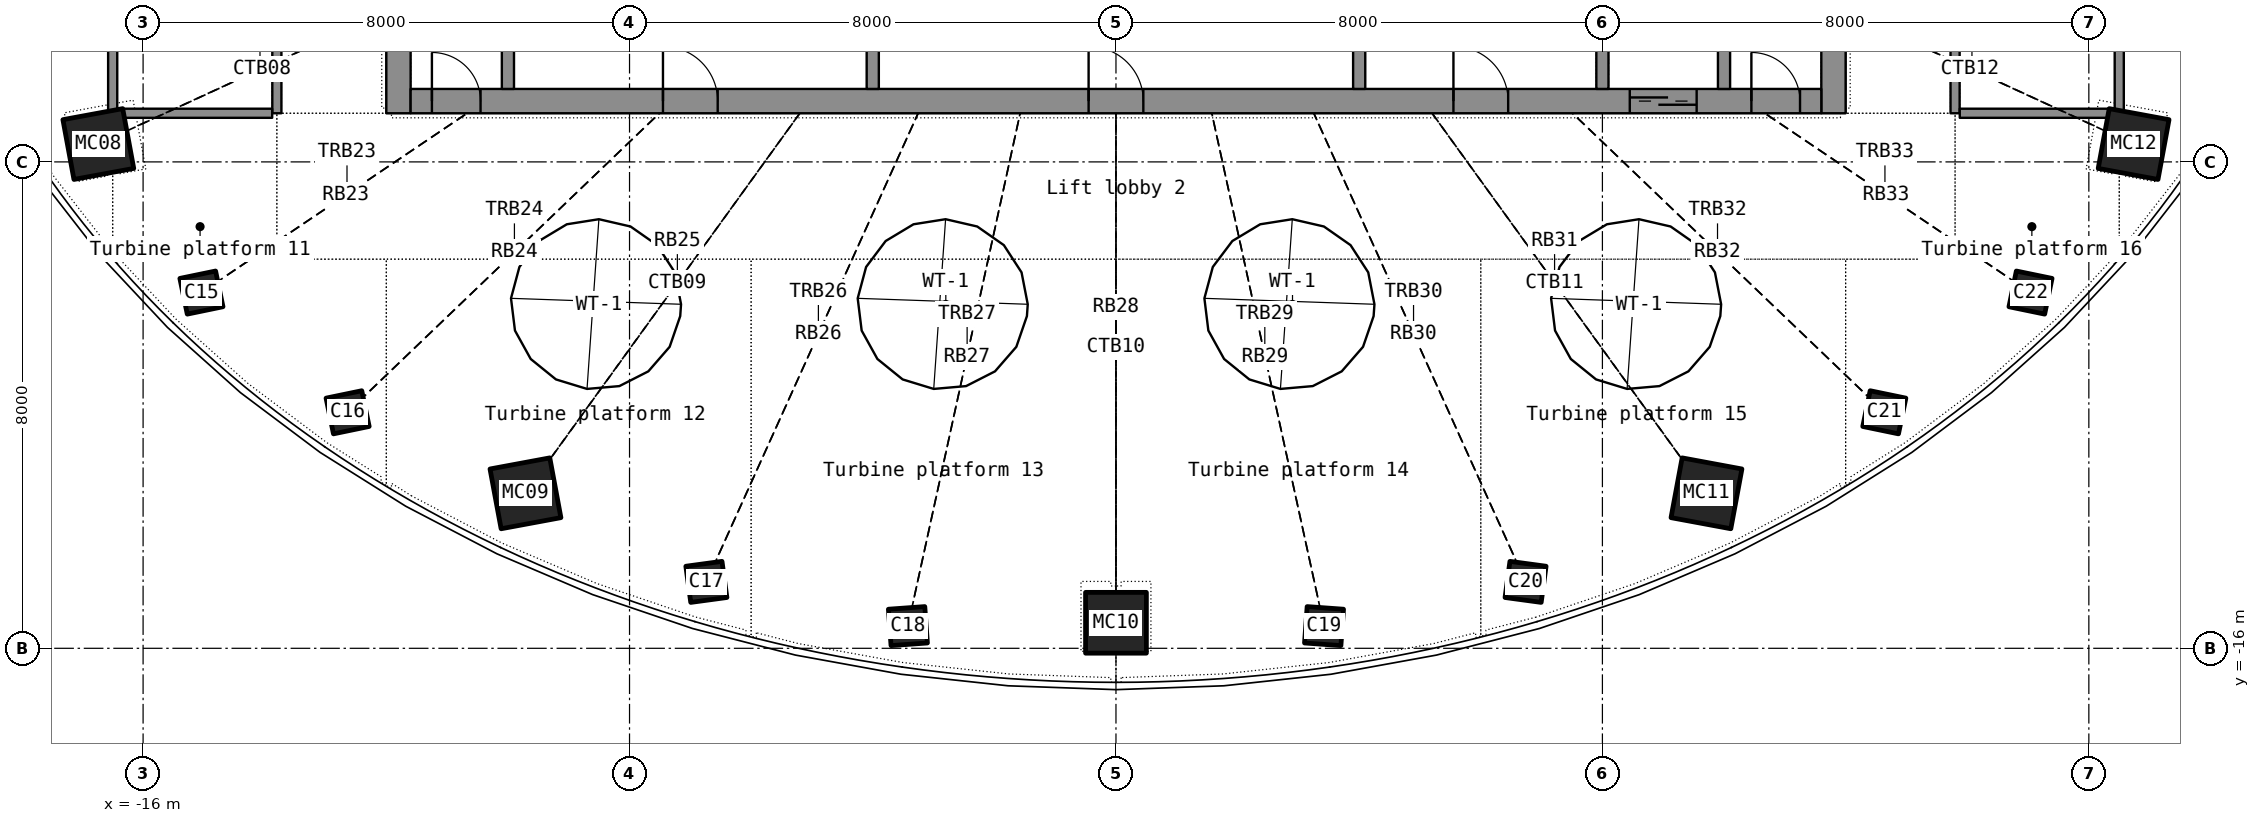
"""IFC4 building model, lengths in metres.
Left out: names, types, materials, properties, quantities, classifications, styles, units other than length and angle.
Written with IfcOpenShell. Run it as: python <this file> out.ifc"""

import sys

from ifc_helpers import new_model, si_unit, direction, frame, frame_2d, origin, origin_2d, place, context, subcontext, project, spatial, rectangle, hollow_rectangle, extrude, element, fill, save


model = new_model("IFC4")
c1 = context("Model", 3, precision=1e-05, world=origin(), true_north=direction((0.0, 1.0)))
c2 = subcontext(c1, "Body", "Model", "MODEL_VIEW")
j1 = project(units=[si_unit("LENGTHUNIT", "METRE"), si_unit("PLANEANGLEUNIT", "RADIAN")], contexts=[c1])
p1 = place(None, origin())
s1 = spatial("IfcSite", under=j1, at=p1, CompositionType="ELEMENT")
p2 = place(p1, origin())
s2 = spatial("IfcBuilding", under=s1, at=p2, CompositionType="ELEMENT")
p3 = place(p2, frame((0.0, 0.0, 265.2)))
s3 = spatial("IfcBuildingStorey", under=s2, at=p3, CompositionType="ELEMENT", Elevation=265.2)
p4 = place(p3, frame((-16.736, -7.706, 0.0), z_axis=(0.02993968, 0.014178483, 0.999451142), x_axis=(-0.58479336, 0.811160032, 0.006010807)))
e1 = element("IfcColumn", 1, at=p4, inside=s3, PredefinedType="COLUMN", context=c2, shape_type="SweptSolid", body=[
    extrude(hollow_rectangle(XDim=1.0, YDim=1.0, WallThickness=0.032, at=origin_2d()), origin(), (0.0, 0.0, 1.0), 7.404),
])
p5 = place(p3, frame((-15.041, -10.149, 0.0), z_axis=(0.026511305, 0.018201791, 0.999482789), x_axis=(-0.721084308, 0.692816746, 0.006509747)))
e2 = element("IfcColumn", 2, at=p5, inside=s3, PredefinedType="COLUMN", context=c2, shape_type="SweptSolid", body=[
    extrude(hollow_rectangle(XDim=0.6, YDim=0.6, WallThickness=0.025, at=origin_2d()), origin(), (0.0, 0.0, 1.0), 7.404),
])
p6 = place(p3, frame((-12.636, -12.118, 0.0), z_axis=(0.022225407, 0.021730776, 0.999516786), x_axis=(-0.829477504, 0.558504573, 0.006301782)))
e3 = element("IfcColumn", 3, at=p6, inside=s3, PredefinedType="COLUMN", context=c2, shape_type="SweptSolid", body=[
    extrude(hollow_rectangle(XDim=0.6, YDim=0.6, WallThickness=0.025, at=origin_2d()), origin(), (0.0, 0.0, 1.0), 7.404),
])
p7 = place(p3, frame((-9.711, -13.451, 0.0), z_axis=(0.017279668, 0.02453449, 0.999549635), x_axis=(-0.908911912, 0.416952184, 0.005478454)))
e4 = element("IfcColumn", 4, at=p7, inside=s3, PredefinedType="COLUMN", context=c2, shape_type="SweptSolid", body=[
    extrude(hollow_rectangle(XDim=1.0, YDim=1.0, WallThickness=0.032, at=origin_2d()), origin(), (0.0, 0.0, 1.0), 7.404),
])
p8 = place(p3, frame((-6.736, -14.907, 0.0), z_axis=(0.011805877, 0.026645666, 0.999575225), x_axis=(-0.960364691, 0.278719123, 0.003912953)))
e5 = element("IfcColumn", 5, at=p8, inside=s3, PredefinedType="COLUMN", context=c2, shape_type="SweptSolid", body=[
    extrude(hollow_rectangle(XDim=0.6, YDim=0.6, WallThickness=0.025, at=origin_2d()), origin(), (0.0, 0.0, 1.0), 7.403),
])
p9 = place(p3, frame((-3.422, -15.635, 0.0), z_axis=(0.006001975, 0.027899292, 0.99959272), x_axis=(-0.990225435, 0.139461007, 0.002053282)))
e6 = element("IfcColumn", 6, at=p9, inside=s3, PredefinedType="COLUMN", context=c2, shape_type="SweptSolid", body=[
    extrude(hollow_rectangle(XDim=0.6, YDim=0.6, WallThickness=0.025, at=origin_2d()), origin(), (0.0, 0.0, 1.0), 7.403),
])
p10 = place(p3, frame((0.0, -15.58, 0.0), z_axis=(0.0, 0.028361125, 0.999597742), x_axis=(-1.0, 0.0, 0.0)))
e7 = element("IfcColumn", 7, at=p10, inside=s3, PredefinedType="COLUMN", context=c2, shape_type="SweptSolid", body=[
    extrude(hollow_rectangle(XDim=1.0, YDim=1.0, WallThickness=0.032, at=origin_2d()), origin(), (0.0, 0.0, 1.0), 7.403),
])
p11 = place(p3, frame((3.422, -15.635, 0.0), z_axis=(-0.006001975, 0.027899292, 0.99959272), x_axis=(-0.990225435, -0.139461007, -0.002053282)))
e8 = element("IfcColumn", 8, at=p11, inside=s3, PredefinedType="COLUMN", context=c2, shape_type="SweptSolid", body=[
    extrude(hollow_rectangle(XDim=0.6, YDim=0.6, WallThickness=0.025, at=origin_2d()), origin(), (0.0, 0.0, 1.0), 7.403),
])
p12 = place(p3, frame((6.736, -14.907, 0.0), z_axis=(-0.011805877, 0.026645666, 0.999575225), x_axis=(-0.960364691, -0.278719123, -0.003912953)))
e9 = element("IfcColumn", 9, at=p12, inside=s3, PredefinedType="COLUMN", context=c2, shape_type="SweptSolid", body=[
    extrude(hollow_rectangle(XDim=0.6, YDim=0.6, WallThickness=0.025, at=origin_2d()), origin(), (0.0, 0.0, 1.0), 7.403),
])
p13 = place(p3, frame((9.711, -13.451, 0.0), z_axis=(-0.017279668, 0.02453449, 0.999549635), x_axis=(-0.908911912, -0.416952184, -0.005478454)))
e10 = element("IfcColumn", 10, at=p13, inside=s3, PredefinedType="COLUMN", context=c2, shape_type="SweptSolid", body=[
    extrude(hollow_rectangle(XDim=1.0, YDim=1.0, WallThickness=0.032, at=origin_2d()), origin(), (0.0, 0.0, 1.0), 7.404),
])
p14 = place(p3, frame((12.636, -12.118, 0.0), z_axis=(-0.022225407, 0.021730776, 0.999516786), x_axis=(-0.829477504, -0.558504573, -0.006301782)))
e11 = element("IfcColumn", 11, at=p14, inside=s3, PredefinedType="COLUMN", context=c2, shape_type="SweptSolid", body=[
    extrude(hollow_rectangle(XDim=0.6, YDim=0.6, WallThickness=0.025, at=origin_2d()), origin(), (0.0, 0.0, 1.0), 7.404),
])
p15 = place(p3, frame((15.041, -10.149, 0.0), z_axis=(-0.026511305, 0.018201791, 0.999482789), x_axis=(-0.721084308, -0.692816746, -0.006509747)))
e12 = element("IfcColumn", 12, at=p15, inside=s3, PredefinedType="COLUMN", context=c2, shape_type="SweptSolid", body=[
    extrude(hollow_rectangle(XDim=0.6, YDim=0.6, WallThickness=0.025, at=origin_2d()), origin(), (0.0, 0.0, 1.0), 7.404),
])
p16 = place(p3, frame((16.736, -7.706, 0.0), z_axis=(-0.02993968, 0.014178483, 0.999451142), x_axis=(-0.58479336, -0.811160032, -0.006010807)))
e13 = element("IfcColumn", 13, at=p16, inside=s3, PredefinedType="COLUMN", context=c2, shape_type="SweptSolid", body=[
    extrude(hollow_rectangle(XDim=1.0, YDim=1.0, WallThickness=0.032, at=origin_2d()), origin(), (0.0, 0.0, 1.0), 7.404),
])
p17 = place(p3, frame((-11.8, -7.2, 0.0), z_axis=(0.0, 0.0, 1.0), x_axis=(0.0, 1.0, 0.0)))
e14 = element("IfcWall", 14, at=p17, inside=s3, PredefinedType="SHEAR", context=c2, shape_type="SweptSolid", body=[
    extrude(rectangle(XDim=14.4, YDim=0.4, at=frame_2d((7.2, 0.0))), origin(), (0.0, 0.0, 1.0), 6.9),
])
p18 = place(p17, frame((6.5, 0.0, 0.0)))
e15 = element("IfcOpeningElement", 15, at=p18, cuts=e14, PredefinedType="OPENING", context=c2, shape_type="SweptSolid", body=[
    extrude(rectangle(XDim=1.4, YDim=2.2, at=frame_2d((0.7, 1.1))), frame((0.0, 0.21, 0.0), z_axis=(0.0, -1.0, 0.0), x_axis=(1.0, 0.0, 0.0)), (0.0, 0.0, 1.0), 0.42),
])
p19 = place(p3, frame((11.8, -7.2, 0.0), z_axis=(0.0, 0.0, 1.0), x_axis=(0.0, 1.0, 0.0)))
e16 = element("IfcWall", 16, at=p19, inside=s3, PredefinedType="SHEAR", context=c2, shape_type="SweptSolid", body=[
    extrude(rectangle(XDim=14.4, YDim=0.4, at=frame_2d((7.2, 0.0))), origin(), (0.0, 0.0, 1.0), 6.9),
])
p20 = place(p19, frame((6.5, 0.0, 0.0)))
e17 = element("IfcOpeningElement", 17, at=p20, cuts=e16, PredefinedType="OPENING", context=c2, shape_type="SweptSolid", body=[
    extrude(rectangle(XDim=1.4, YDim=2.2, at=frame_2d((0.7, 1.1))), frame((0.0, 0.21, 0.0), z_axis=(0.0, -1.0, 0.0), x_axis=(1.0, 0.0, 0.0)), (0.0, 0.0, 1.0), 0.42),
])
p21 = place(p3, frame((-11.6, -7.0, 0.0), z_axis=(0.0, 0.0, 1.0), x_axis=(1.0, 0.0, 0.0)))
e18 = element("IfcWall", 18, at=p21, inside=s3, PredefinedType="SHEAR", context=c2, shape_type="SweptSolid", body=[
    extrude(rectangle(XDim=23.2, YDim=0.4, at=frame_2d((11.6, 0.0))), origin(), (0.0, 0.0, 1.0), 6.9),
])
p22 = place(p21, frame((20.05, 0.0, 0.0)))
e19 = element("IfcOpeningElement", 19, at=p22, cuts=e18, PredefinedType="OPENING", context=c2, shape_type="SweptSolid", body=[
    extrude(rectangle(XDim=1.1, YDim=2.2, at=frame_2d((0.55, 1.1))), frame((0.0, 0.21, 0.0), z_axis=(0.0, -1.0, 0.0), x_axis=(1.0, 0.0, 0.0)), (0.0, 0.0, 1.0), 0.42),
])
p23 = place(p21, frame((4.15, 0.0, 0.0)))
e20 = element("IfcOpeningElement", 20, at=p23, cuts=e18, PredefinedType="OPENING", context=c2, shape_type="SweptSolid", body=[
    extrude(rectangle(XDim=0.9, YDim=2.1, at=frame_2d((0.45, 1.05))), frame((0.0, 0.21, 0.0), z_axis=(0.0, -1.0, 0.0), x_axis=(1.0, 0.0, 0.0)), (0.0, 0.0, 1.0), 0.42),
])
p24 = place(p21, frame((11.15, 0.0, 0.0)))
e21 = element("IfcOpeningElement", 21, at=p24, cuts=e18, PredefinedType="OPENING", context=c2, shape_type="SweptSolid", body=[
    extrude(rectangle(XDim=0.9, YDim=2.1, at=frame_2d((0.45, 1.05))), frame((0.0, 0.21, 0.0), z_axis=(0.0, -1.0, 0.0), x_axis=(1.0, 0.0, 0.0)), (0.0, 0.0, 1.0), 0.42),
])
p25 = place(p21, frame((17.15, 0.0, 0.0)))
e22 = element("IfcOpeningElement", 22, at=p25, cuts=e18, PredefinedType="OPENING", context=c2, shape_type="SweptSolid", body=[
    extrude(rectangle(XDim=0.9, YDim=2.1, at=frame_2d((0.45, 1.05))), frame((0.0, 0.21, 0.0), z_axis=(0.0, -1.0, 0.0), x_axis=(1.0, 0.0, 0.0)), (0.0, 0.0, 1.0), 0.42),
])
p26 = place(p21, frame((0.35, 0.0, 0.0)))
e23 = element("IfcOpeningElement", 23, at=p26, cuts=e18, PredefinedType="OPENING", context=c2, shape_type="SweptSolid", body=[
    extrude(rectangle(XDim=0.8, YDim=2.05, at=frame_2d((0.4, 1.025))), frame((0.0, 0.21, 0.0), z_axis=(0.0, -1.0, 0.0), x_axis=(1.0, 0.0, 0.0)), (0.0, 0.0, 1.0), 0.42),
])
p27 = place(p21, frame((22.05, 0.0, 0.0)))
e24 = element("IfcOpeningElement", 24, at=p27, cuts=e18, PredefinedType="OPENING", context=c2, shape_type="SweptSolid", body=[
    extrude(rectangle(XDim=0.8, YDim=2.05, at=frame_2d((0.4, 1.025))), frame((0.0, 0.21, 0.0), z_axis=(0.0, -1.0, 0.0), x_axis=(1.0, 0.0, 0.0)), (0.0, 0.0, 1.0), 0.42),
])
for number, where, z_axis, x_axis in (
    (25, (-10.0, -6.8, 0.0), (0.0, 0.0, 1.0), (0.0, 1.0, 0.0)),
    (26, (8.0, -6.8, 0.0), (0.0, 0.0, 1.0), (0.0, 1.0, 0.0)),
    (27, (10.0, -6.8, 0.0), (0.0, 0.0, 1.0), (0.0, 1.0, 0.0)),
):
    element("IfcWall", number, at=place(p3, frame(where, z_axis=z_axis, x_axis=x_axis)), inside=s3, PredefinedType="SHEAR", context=c2, shape_type="SweptSolid", body=[
        extrude(rectangle(XDim=2.9, YDim=0.2, at=frame_2d((1.45, 0.0))), origin(), (0.0, 0.0, 1.0), 6.9),
    ])
for number, where, z_axis, x_axis in (
    (28, (-4.0, -6.8, 0.0), (0.0, 0.0, 1.0), (0.0, 1.0, 0.0)),
    (29, (4.0, -6.8, 0.0), (0.0, 0.0, 1.0), (0.0, 1.0, 0.0)),
):
    element("IfcWall", number, at=place(p3, frame(where, z_axis=z_axis, x_axis=x_axis)), inside=s3, PredefinedType="PARTITIONING", context=c2, shape_type="SweptSolid", body=[
        extrude(rectangle(XDim=2.9, YDim=0.2, at=frame_2d((1.45, 0.0))), origin(), (0.0, 0.0, 1.0), 6.9),
    ])
p28 = place(p3, frame((-16.5, -1.2, 0.0), z_axis=(0.0, 0.0, 1.0), x_axis=(0.0, -1.0, 0.0)))
e30 = element("IfcWall", 30, at=p28, inside=s3, PredefinedType="PARTITIONING", context=c2, shape_type="SweptSolid", body=[
    extrude(rectangle(XDim=6.012, YDim=0.15, at=frame_2d((3.006, 0.0))), origin(), (0.0, 0.0, 1.0), 6.1),
])
p29 = place(p28, frame((2.531, 0.0, 0.0)))
e31 = element("IfcOpeningElement", 31, at=p29, cuts=e30, PredefinedType="OPENING", context=c2, shape_type="SweptSolid", body=[
    extrude(rectangle(XDim=0.95, YDim=2.15, at=frame_2d((0.475, 1.075))), frame((0.0, 0.085, 0.0), z_axis=(0.0, -1.0, 0.0), x_axis=(1.0, 0.0, 0.0)), (0.0, 0.0, 1.0), 0.17),
])
p30 = place(p3, frame((16.5, -7.212, 0.0), z_axis=(0.0, 0.0, 1.0), x_axis=(0.0, 1.0, 0.0)))
e32 = element("IfcWall", 32, at=p30, inside=s3, PredefinedType="PARTITIONING", context=c2, shape_type="SweptSolid", body=[
    extrude(rectangle(XDim=6.012, YDim=0.15, at=frame_2d((3.006, 0.0))), origin(), (0.0, 0.0, 1.0), 6.1),
])
p31 = place(p30, frame((2.506, 0.0, 0.0)))
e33 = element("IfcOpeningElement", 33, at=p31, cuts=e32, PredefinedType="OPENING", context=c2, shape_type="SweptSolid", body=[
    extrude(rectangle(XDim=1.0, YDim=2.2, at=frame_2d((0.5, 1.1))), frame((0.0, 0.085, 0.0), z_axis=(0.0, -1.0, 0.0), x_axis=(1.0, 0.0, 0.0)), (0.0, 0.0, 1.0), 0.17),
])
for number, where, z_axis, x_axis in (
    (34, (-13.8, -1.2, 0.0), (0.0, 0.0, 1.0), (0.0, -1.0, 0.0)),
    (35, (13.8, -7.2, 0.0), (0.0, 0.0, 1.0), (0.0, 1.0, 0.0)),
):
    element("IfcWall", number, at=place(p3, frame(where, z_axis=z_axis, x_axis=x_axis)), inside=s3, PredefinedType="PARTITIONING", context=c2, shape_type="SweptSolid", body=[
        extrude(rectangle(XDim=6.0, YDim=0.15, at=frame_2d((3.0, 0.0))), origin(), (0.0, 0.0, 1.0), 6.1),
    ])
for number, where, z_axis, x_axis in (
    (36, (-16.423, -7.2, 0.0), (0.0, 0.0, 1.0), (1.0, 0.0, 0.0)),
    (37, (13.877, -7.2, 0.0), (0.0, 0.0, 1.0), (1.0, 0.0, 0.0)),
):
    element("IfcWall", number, at=place(p3, frame(where, z_axis=z_axis, x_axis=x_axis)), inside=s3, PredefinedType="PARTITIONING", context=c2, shape_type="SweptSolid", body=[
        extrude(rectangle(XDim=2.546, YDim=0.15, at=frame_2d((1.273, 0.0))), origin(), (0.0, 0.0, 1.0), 6.1),
    ])
p32 = place(p22, origin())
e38 = element("IfcDoor", 38, at=p32, inside=s3, OperationType="DOUBLE_DOOR_SLIDING", PredefinedType="DOOR", context=c2, shape_type="SweptSolid", body=[
    extrude(rectangle(XDim=1.1, YDim=2.2, at=frame_2d((0.55, 1.1))), frame((0.0, 0.025, 0.0), z_axis=(0.0, -1.0, 0.0), x_axis=(1.0, 0.0, 0.0)), (0.0, 0.0, 1.0), 0.05),
])
fill(e19, e38)
p33 = place(p23, origin())
e39 = element("IfcDoor", 39, at=p33, inside=s3, OperationType="SINGLE_SWING_LEFT", PredefinedType="DOOR", context=c2, shape_type="SweptSolid", body=[
    extrude(rectangle(XDim=0.9, YDim=2.1, at=frame_2d((0.45, 1.05))), frame((0.0, 0.025, 0.0), z_axis=(0.0, -1.0, 0.0), x_axis=(1.0, 0.0, 0.0)), (0.0, 0.0, 1.0), 0.05),
])
fill(e20, e39)
p34 = place(p24, origin())
e40 = element("IfcDoor", 40, at=p34, inside=s3, OperationType="SINGLE_SWING_LEFT", PredefinedType="DOOR", context=c2, shape_type="SweptSolid", body=[
    extrude(rectangle(XDim=0.9, YDim=2.1, at=frame_2d((0.45, 1.05))), frame((0.0, 0.025, 0.0), z_axis=(0.0, -1.0, 0.0), x_axis=(1.0, 0.0, 0.0)), (0.0, 0.0, 1.0), 0.05),
])
fill(e21, e40)
p35 = place(p25, origin())
e41 = element("IfcDoor", 41, at=p35, inside=s3, OperationType="SINGLE_SWING_LEFT", PredefinedType="DOOR", context=c2, shape_type="SweptSolid", body=[
    extrude(rectangle(XDim=0.9, YDim=2.1, at=frame_2d((0.45, 1.05))), frame((0.0, 0.025, 0.0), z_axis=(0.0, -1.0, 0.0), x_axis=(1.0, 0.0, 0.0)), (0.0, 0.0, 1.0), 0.05),
])
fill(e22, e41)
p36 = place(p26, origin())
e42 = element("IfcDoor", 42, at=p36, inside=s3, OperationType="SINGLE_SWING_LEFT", PredefinedType="DOOR", context=c2, shape_type="SweptSolid", body=[
    extrude(rectangle(XDim=0.8, YDim=2.05, at=frame_2d((0.4, 1.025))), frame((0.0, 0.025, 0.0), z_axis=(0.0, -1.0, 0.0), x_axis=(1.0, 0.0, 0.0)), (0.0, 0.0, 1.0), 0.05),
])
fill(e23, e42)
p37 = place(p27, origin())
e43 = element("IfcDoor", 43, at=p37, inside=s3, OperationType="SINGLE_SWING_LEFT", PredefinedType="DOOR", context=c2, shape_type="SweptSolid", body=[
    extrude(rectangle(XDim=0.8, YDim=2.05, at=frame_2d((0.4, 1.025))), frame((0.0, 0.025, 0.0), z_axis=(0.0, -1.0, 0.0), x_axis=(1.0, 0.0, 0.0)), (0.0, 0.0, 1.0), 0.05),
])
fill(e24, e43)
save(model, sys.argv[1])
